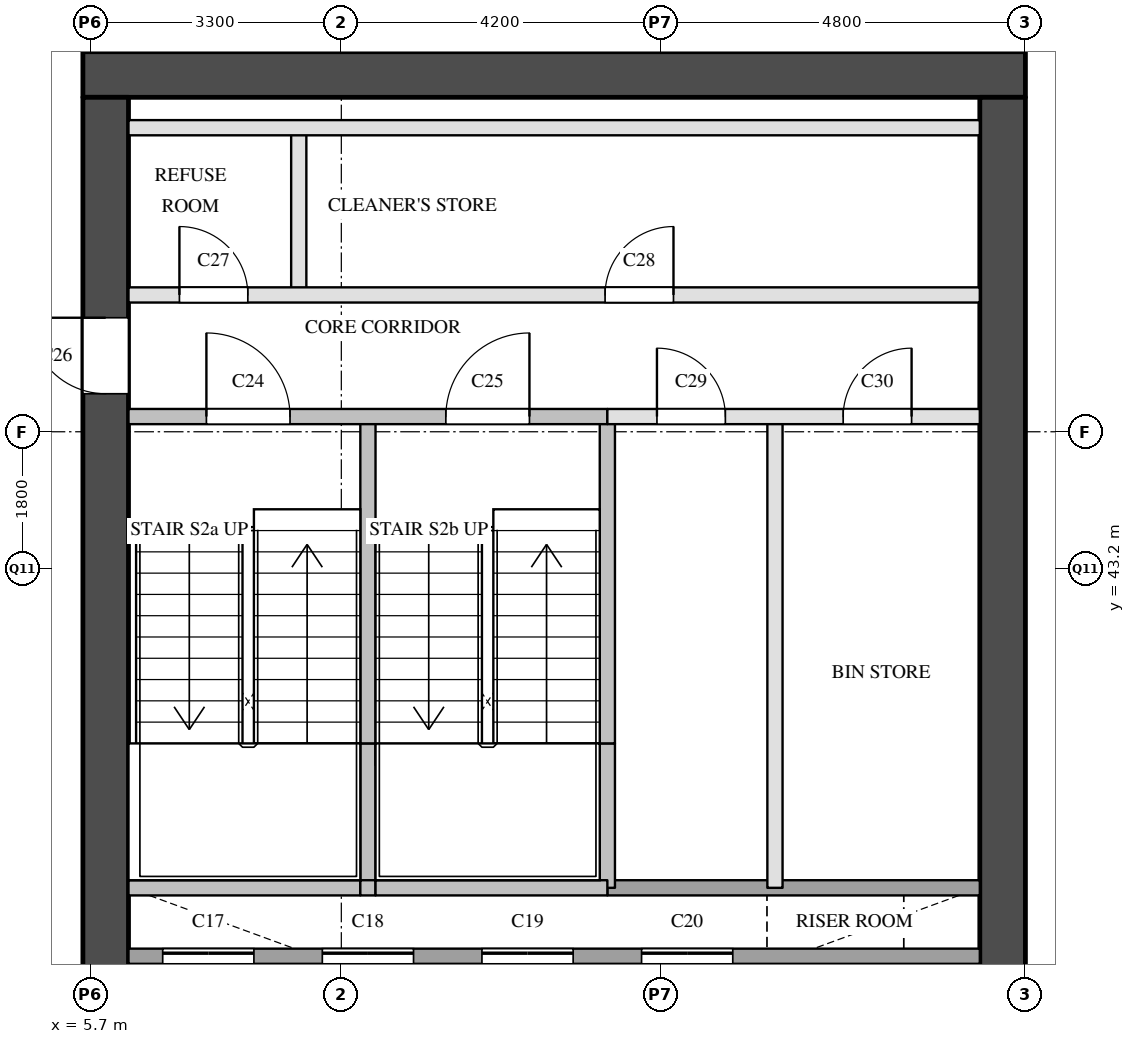
"""IFC4 building model, lengths in metres.
Left out: names, types, materials, properties, quantities, classifications, styles, units other than length and angle.
Written with IfcOpenShell. Run it as: python <this file> out.ifc"""

import sys

from ifc_helpers import new_model, si_unit, direction, frame, frame_2d, origin, place, context, subcontext, project, spatial, rectangle, extrude, element, fill, save


model = new_model("IFC4")
c1 = context("Model", 3, precision=1e-05, world=origin(), true_north=direction((0.0, 1.0)))
c2 = subcontext(c1, "Body", "Model", "MODEL_VIEW")
j1 = project(units=[si_unit("LENGTHUNIT", "METRE"), si_unit("PLANEANGLEUNIT", "RADIAN")], contexts=[c1])
p1 = place(None, origin())
s1 = spatial("IfcSite", under=j1, at=p1, CompositionType="ELEMENT")
p2 = place(p1, origin())
s2 = spatial("IfcBuilding", under=s1, at=p2, CompositionType="ELEMENT")
p3 = place(p2, frame((0.0, 0.0, 93.0)))
s3 = spatial("IfcBuildingStorey", under=s2, at=p3, CompositionType="ELEMENT", Elevation=93.0)
p4 = place(p3, frame((5.6, 49.7, 0.0), z_axis=(0.0, 0.0, 1.0), x_axis=(1.0, 0.0, 0.0)))
e1 = element("IfcWall", 1, at=p4, inside=s3, PredefinedType="SHEAR", context=c2, shape_type="SweptSolid", body=[
    extrude(rectangle(XDim=12.4, YDim=0.6, at=frame_2d((6.2, 0.0))), origin(), (0.0, 0.0, 1.0), 3.5),
])
p5 = place(p3, frame((5.9, 29.1, 0.0), z_axis=(0.0, 0.0, 1.0), x_axis=(0.0, 1.0, 0.0)))
e2 = element("IfcWall", 2, at=p5, inside=s3, PredefinedType="SHEAR", context=c2, shape_type="SweptSolid", body=[
    extrude(rectangle(XDim=20.3, YDim=0.6, at=frame_2d((10.15, 0.0))), origin(), (0.0, 0.0, 1.0), 3.5),
])
p6 = place(p5, frame((3.6, 0.0, 0.0)))
e3 = element("IfcOpeningElement", 3, at=p6, cuts=e2, PredefinedType="OPENING", context=c2, shape_type="SweptSolid", body=[
    extrude(rectangle(XDim=1.8, YDim=2.1, at=frame_2d((0.9, 1.05))), frame((0.0, 0.31, 0.0), z_axis=(0.0, -1.0, 0.0), x_axis=(1.0, 0.0, 0.0)), (0.0, 0.0, 1.0), 0.62),
])
p7 = place(p5, frame((16.4, 0.0, 0.0)))
e4 = element("IfcOpeningElement", 4, at=p7, cuts=e2, PredefinedType="OPENING", context=c2, shape_type="SweptSolid", body=[
    extrude(rectangle(XDim=1.0, YDim=2.1, at=frame_2d((0.5, 1.05))), frame((0.0, 0.31, 0.0), z_axis=(0.0, -1.0, 0.0), x_axis=(1.0, 0.0, 0.0)), (0.0, 0.0, 1.0), 0.62),
])
p8 = place(p3, frame((17.7, 29.1, 0.0), z_axis=(0.0, 0.0, 1.0), x_axis=(0.0, 1.0, 0.0)))
e5 = element("IfcWall", 5, at=p8, inside=s3, PredefinedType="SHEAR", context=c2, shape_type="SweptSolid", body=[
    extrude(rectangle(XDim=20.3, YDim=0.6, at=frame_2d((10.15, 0.0))), origin(), (0.0, 0.0, 1.0), 3.5),
])
p9 = place(p8, frame((1.25, 0.0, 0.0)))
e6 = element("IfcOpeningElement", 6, at=p9, cuts=e5, PredefinedType="OPENING", context=c2, shape_type="SweptSolid", body=[
    extrude(rectangle(XDim=0.7, YDim=2.1, at=frame_2d((0.35, 1.05))), frame((0.0, 0.31, 0.0), z_axis=(0.0, -1.0, 0.0), x_axis=(1.0, 0.0, 0.0)), (0.0, 0.0, 1.0), 0.62),
])
p10 = place(p8, frame((7.05, 0.0, 0.0)))
e7 = element("IfcOpeningElement", 7, at=p10, cuts=e5, PredefinedType="OPENING", context=c2, shape_type="SweptSolid", body=[
    extrude(rectangle(XDim=0.7, YDim=2.1, at=frame_2d((0.35, 1.05))), frame((0.0, 0.31, 0.0), z_axis=(0.0, -1.0, 0.0), x_axis=(1.0, 0.0, 0.0)), (0.0, 0.0, 1.0), 0.62),
])
p11 = place(p3, frame((8.3, 34.9, 0.0), z_axis=(0.0, 0.0, 1.0), x_axis=(0.0, 1.0, 0.0)))
e8 = element("IfcWall", 8, at=p11, inside=s3, PredefinedType="SOLIDWALL", context=c2, shape_type="SweptSolid", body=[
    extrude(rectangle(XDim=3.2, YDim=0.2, at=frame_2d((1.6, 0.0))), origin(), (0.0, 0.0, 1.0), 3.5),
])
p12 = place(p3, frame((8.44, 46.8, 0.0), z_axis=(0.0, 0.0, 1.0), x_axis=(0.0, 1.0, 0.0)))
e9 = element("IfcWall", 9, at=p12, inside=s3, PredefinedType="PARTITIONING", context=c2, shape_type="SweptSolid", body=[
    extrude(rectangle(XDim=2.2, YDim=0.2, at=frame_2d((1.1, 0.0))), origin(), (0.0, 0.0, 1.0), 3.5),
])
p13 = place(p3, frame((9.35, 39.0, 0.0), z_axis=(0.0, 0.0, 1.0), x_axis=(0.0, 1.0, 0.0)))
e10 = element("IfcWall", 10, at=p13, inside=s3, PredefinedType="SOLIDWALL", context=c2, shape_type="SweptSolid", body=[
    extrude(rectangle(XDim=1.9, YDim=0.2, at=frame_2d((0.95, 0.0))), origin(), (0.0, 0.0, 1.0), 3.5),
])
p14 = place(p3, frame((9.35, 40.9, 0.0), z_axis=(0.0, 0.0, 1.0), x_axis=(0.0, 1.0, 0.0)))
e11 = element("IfcWall", 11, at=p14, inside=s3, PredefinedType="SOLIDWALL", context=c2, shape_type="SweptSolid", body=[
    extrude(rectangle(XDim=4.3, YDim=0.2, at=frame_2d((2.15, 0.0))), origin(), (0.0, 0.0, 1.0), 3.5),
])
for number, where, z_axis, x_axis in (
    (12, (10.4, 34.9, 0.0), (0.0, 0.0, 1.0), (0.0, 1.0, 0.0)),
    (13, (12.5, 34.9, 0.0), (0.0, 0.0, 1.0), (0.0, 1.0, 0.0)),
):
    element("IfcWall", number, at=place(p3, frame(where, z_axis=z_axis, x_axis=x_axis)), inside=s3, PredefinedType="SOLIDWALL", context=c2, shape_type="SweptSolid", body=[
        extrude(rectangle(XDim=3.2, YDim=0.2, at=frame_2d((1.6, 0.0))), origin(), (0.0, 0.0, 1.0), 3.5),
    ])
p15 = place(p3, frame((12.5, 39.0, 0.0), z_axis=(0.0, 0.0, 1.0), x_axis=(0.0, 1.0, 0.0)))
e14 = element("IfcWall", 14, at=p15, inside=s3, PredefinedType="SOLIDWALL", context=c2, shape_type="SweptSolid", body=[
    extrude(rectangle(XDim=1.9, YDim=0.2, at=frame_2d((0.95, 0.0))), origin(), (0.0, 0.0, 1.0), 3.5),
])
p16 = place(p3, frame((12.5, 40.9, 0.0), z_axis=(0.0, 0.0, 1.0), x_axis=(0.0, 1.0, 0.0)))
e15 = element("IfcWall", 15, at=p16, inside=s3, PredefinedType="SOLIDWALL", context=c2, shape_type="SweptSolid", body=[
    extrude(rectangle(XDim=4.3, YDim=0.2, at=frame_2d((2.15, 0.0))), origin(), (0.0, 0.0, 1.0), 3.5),
])
p17 = place(p3, frame((14.6, 34.9, 0.0), z_axis=(0.0, 0.0, 1.0), x_axis=(0.0, 1.0, 0.0)))
e16 = element("IfcWall", 16, at=p17, inside=s3, PredefinedType="SOLIDWALL", context=c2, shape_type="SweptSolid", body=[
    extrude(rectangle(XDim=3.2, YDim=0.2, at=frame_2d((1.6, 0.0))), origin(), (0.0, 0.0, 1.0), 3.5),
])
p18 = place(p3, frame((14.705, 39.0, 0.0), z_axis=(0.0, 0.0, 1.0), x_axis=(0.0, 1.0, 0.0)))
e17 = element("IfcWall", 17, at=p18, inside=s3, PredefinedType="PARTITIONING", context=c2, shape_type="SweptSolid", body=[
    extrude(rectangle(XDim=6.2, YDim=0.2, at=frame_2d((3.1, 0.0))), origin(), (0.0, 0.0, 1.0), 3.5),
])
p19 = place(p3, frame((16.7, 34.9, 0.0), z_axis=(0.0, 0.0, 1.0), x_axis=(0.0, 1.0, 0.0)))
e18 = element("IfcWall", 18, at=p19, inside=s3, PredefinedType="SOLIDWALL", context=c2, shape_type="SweptSolid", body=[
    extrude(rectangle(XDim=3.2, YDim=0.2, at=frame_2d((1.6, 0.0))), origin(), (0.0, 0.0, 1.0), 3.5),
])
p20 = place(p3, frame((6.2, 38.1, 0.0), z_axis=(0.0, 0.0, 1.0), x_axis=(1.0, 0.0, 0.0)))
e19 = element("IfcWall", 19, at=p20, inside=s3, PredefinedType="SOLIDWALL", context=c2, shape_type="SweptSolid", body=[
    extrude(rectangle(XDim=11.2, YDim=0.2, at=frame_2d((5.6, 0.0))), origin(), (0.0, 0.0, 1.0), 3.5),
])
p21 = place(p20, frame((0.45, 0.0, 0.0)))
e20 = element("IfcOpeningElement", 20, at=p21, cuts=e19, PredefinedType="OPENING", context=c2, shape_type="SweptSolid", body=[
    extrude(rectangle(XDim=1.2, YDim=2.1, at=frame_2d((0.6, 1.05))), frame((0.0, 0.11, 0.0), z_axis=(0.0, -1.0, 0.0), x_axis=(1.0, 0.0, 0.0)), (0.0, 0.0, 1.0), 0.22),
])
p22 = place(p20, frame((2.55, 0.0, 0.0)))
e21 = element("IfcOpeningElement", 21, at=p22, cuts=e19, PredefinedType="OPENING", context=c2, shape_type="SweptSolid", body=[
    extrude(rectangle(XDim=1.2, YDim=2.1, at=frame_2d((0.6, 1.05))), frame((0.0, 0.11, 0.0), z_axis=(0.0, -1.0, 0.0), x_axis=(1.0, 0.0, 0.0)), (0.0, 0.0, 1.0), 0.22),
])
p23 = place(p20, frame((4.65, 0.0, 0.0)))
e22 = element("IfcOpeningElement", 22, at=p23, cuts=e19, PredefinedType="OPENING", context=c2, shape_type="SweptSolid", body=[
    extrude(rectangle(XDim=1.2, YDim=2.1, at=frame_2d((0.6, 1.05))), frame((0.0, 0.11, 0.0), z_axis=(0.0, -1.0, 0.0), x_axis=(1.0, 0.0, 0.0)), (0.0, 0.0, 1.0), 0.22),
])
p24 = place(p20, frame((6.75, 0.0, 0.0)))
e23 = element("IfcOpeningElement", 23, at=p24, cuts=e19, PredefinedType="OPENING", context=c2, shape_type="SweptSolid", body=[
    extrude(rectangle(XDim=1.2, YDim=2.1, at=frame_2d((0.6, 1.05))), frame((0.0, 0.11, 0.0), z_axis=(0.0, -1.0, 0.0), x_axis=(1.0, 0.0, 0.0)), (0.0, 0.0, 1.0), 0.22),
])
p25 = place(p3, frame((12.5, 39.0, 0.0), z_axis=(0.0, 0.0, 1.0), x_axis=(1.0, 0.0, 0.0)))
e24 = element("IfcWall", 24, at=p25, inside=s3, PredefinedType="SOLIDWALL", context=c2, shape_type="SweptSolid", body=[
    extrude(rectangle(XDim=4.9, YDim=0.2, at=frame_2d((2.45, 0.0))), origin(), (0.0, 0.0, 1.0), 3.5),
])
p26 = place(p3, frame((6.2, 39.0, 0.0), z_axis=(0.0, 0.0, 1.0), x_axis=(1.0, 0.0, 0.0)))
e25 = element("IfcWall", 25, at=p26, inside=s3, PredefinedType="SOLIDWALL", context=c2, shape_type="SweptSolid", body=[
    extrude(rectangle(XDim=3.05, YDim=0.2, at=frame_2d((1.525, 0.0))), origin(), (0.0, 0.0, 1.0), 3.5),
])
p27 = place(p3, frame((9.25, 39.0, 0.0), z_axis=(0.0, 0.0, 1.0), x_axis=(1.0, 0.0, 0.0)))
e26 = element("IfcWall", 26, at=p27, inside=s3, PredefinedType="SOLIDWALL", context=c2, shape_type="SweptSolid", body=[
    extrude(rectangle(XDim=0.2, YDim=0.2, at=frame_2d((0.1, 0.0))), origin(), (0.0, 0.0, 1.0), 3.5),
])
p28 = place(p3, frame((9.45, 39.0, 0.0), z_axis=(0.0, 0.0, 1.0), x_axis=(1.0, 0.0, 0.0)))
e27 = element("IfcWall", 27, at=p28, inside=s3, PredefinedType="SOLIDWALL", context=c2, shape_type="SweptSolid", body=[
    extrude(rectangle(XDim=3.05, YDim=0.2, at=frame_2d((1.525, 0.0))), origin(), (0.0, 0.0, 1.0), 3.5),
])
p29 = place(p3, frame((12.5, 45.2, 0.0), z_axis=(0.0, 0.0, 1.0), x_axis=(1.0, 0.0, 0.0)))
e28 = element("IfcWall", 28, at=p29, inside=s3, PredefinedType="PARTITIONING", context=c2, shape_type="SweptSolid", body=[
    extrude(rectangle(XDim=4.9, YDim=0.2, at=frame_2d((2.45, 0.0))), origin(), (0.0, 0.0, 1.0), 3.5),
])
p30 = place(p29, frame((0.653, 0.0, 0.0)))
e29 = element("IfcOpeningElement", 29, at=p30, cuts=e28, PredefinedType="OPENING", context=c2, shape_type="SweptSolid", body=[
    extrude(rectangle(XDim=0.9, YDim=2.1, at=frame_2d((0.45, 1.05))), frame((0.0, 0.11, 0.0), z_axis=(0.0, -1.0, 0.0), x_axis=(1.0, 0.0, 0.0)), (0.0, 0.0, 1.0), 0.22),
])
p31 = place(p29, frame((3.103, 0.0, 0.0)))
e30 = element("IfcOpeningElement", 30, at=p31, cuts=e28, PredefinedType="OPENING", context=c2, shape_type="SweptSolid", body=[
    extrude(rectangle(XDim=0.9, YDim=2.1, at=frame_2d((0.45, 1.05))), frame((0.0, 0.11, 0.0), z_axis=(0.0, -1.0, 0.0), x_axis=(1.0, 0.0, 0.0)), (0.0, 0.0, 1.0), 0.22),
])
p32 = place(p3, frame((6.2, 45.2, 0.0), z_axis=(0.0, 0.0, 1.0), x_axis=(1.0, 0.0, 0.0)))
e31 = element("IfcWall", 31, at=p32, inside=s3, PredefinedType="SOLIDWALL", context=c2, shape_type="SweptSolid", body=[
    extrude(rectangle(XDim=6.3, YDim=0.2, at=frame_2d((3.15, 0.0))), origin(), (0.0, 0.0, 1.0), 3.5),
])
p33 = place(p32, frame((1.025, 0.0, 0.0)))
e32 = element("IfcOpeningElement", 32, at=p33, cuts=e31, PredefinedType="OPENING", context=c2, shape_type="SweptSolid", body=[
    extrude(rectangle(XDim=1.1, YDim=2.1, at=frame_2d((0.55, 1.05))), frame((0.0, 0.11, 0.0), z_axis=(0.0, -1.0, 0.0), x_axis=(1.0, 0.0, 0.0)), (0.0, 0.0, 1.0), 0.22),
])
p34 = place(p32, frame((4.175, 0.0, 0.0)))
e33 = element("IfcOpeningElement", 33, at=p34, cuts=e31, PredefinedType="OPENING", context=c2, shape_type="SweptSolid", body=[
    extrude(rectangle(XDim=1.1, YDim=2.1, at=frame_2d((0.55, 1.05))), frame((0.0, 0.11, 0.0), z_axis=(0.0, -1.0, 0.0), x_axis=(1.0, 0.0, 0.0)), (0.0, 0.0, 1.0), 0.22),
])
p35 = place(p3, frame((6.2, 46.8, 0.0), z_axis=(0.0, 0.0, 1.0), x_axis=(1.0, 0.0, 0.0)))
e34 = element("IfcWall", 34, at=p35, inside=s3, PredefinedType="PARTITIONING", context=c2, shape_type="SweptSolid", body=[
    extrude(rectangle(XDim=11.2, YDim=0.2, at=frame_2d((5.6, 0.0))), origin(), (0.0, 0.0, 1.0), 3.5),
])
p36 = place(p35, frame((0.67, 0.0, 0.0)))
e35 = element("IfcOpeningElement", 35, at=p36, cuts=e34, PredefinedType="OPENING", context=c2, shape_type="SweptSolid", body=[
    extrude(rectangle(XDim=0.9, YDim=2.1, at=frame_2d((0.45, 1.05))), frame((0.0, 0.11, 0.0), z_axis=(0.0, -1.0, 0.0), x_axis=(1.0, 0.0, 0.0)), (0.0, 0.0, 1.0), 0.22),
])
p37 = place(p35, frame((6.27, 0.0, 0.0)))
e36 = element("IfcOpeningElement", 36, at=p37, cuts=e34, PredefinedType="OPENING", context=c2, shape_type="SweptSolid", body=[
    extrude(rectangle(XDim=0.9, YDim=2.1, at=frame_2d((0.45, 1.05))), frame((0.0, 0.11, 0.0), z_axis=(0.0, -1.0, 0.0), x_axis=(1.0, 0.0, 0.0)), (0.0, 0.0, 1.0), 0.22),
])
p38 = place(p3, frame((6.2, 49.0, 0.0), z_axis=(0.0, 0.0, 1.0), x_axis=(1.0, 0.0, 0.0)))
e37 = element("IfcWall", 37, at=p38, inside=s3, PredefinedType="PARTITIONING", context=c2, shape_type="SweptSolid", body=[
    extrude(rectangle(XDim=11.2, YDim=0.2, at=frame_2d((5.6, 0.0))), origin(), (0.0, 0.0, 1.0), 3.5),
])
p39 = place(p21, origin())
e38 = element("IfcDoor", 38, at=p39, inside=s3, OperationType="SLIDING_TO_LEFT", PredefinedType="DOOR", context=c2, shape_type="SweptSolid", body=[
    extrude(rectangle(XDim=1.2, YDim=2.1, at=frame_2d((0.6, 1.05))), frame((0.0, 0.025, 0.0), z_axis=(0.0, -1.0, 0.0), x_axis=(1.0, 0.0, 0.0)), (0.0, 0.0, 1.0), 0.05),
])
fill(e20, e38)
p40 = place(p22, origin())
e39 = element("IfcDoor", 39, at=p40, inside=s3, OperationType="SLIDING_TO_LEFT", PredefinedType="DOOR", context=c2, shape_type="SweptSolid", body=[
    extrude(rectangle(XDim=1.2, YDim=2.1, at=frame_2d((0.6, 1.05))), frame((0.0, 0.025, 0.0), z_axis=(0.0, -1.0, 0.0), x_axis=(1.0, 0.0, 0.0)), (0.0, 0.0, 1.0), 0.05),
])
fill(e21, e39)
p41 = place(p23, origin())
e40 = element("IfcDoor", 40, at=p41, inside=s3, OperationType="SLIDING_TO_LEFT", PredefinedType="DOOR", context=c2, shape_type="SweptSolid", body=[
    extrude(rectangle(XDim=1.2, YDim=2.1, at=frame_2d((0.6, 1.05))), frame((0.0, 0.025, 0.0), z_axis=(0.0, -1.0, 0.0), x_axis=(1.0, 0.0, 0.0)), (0.0, 0.0, 1.0), 0.05),
])
fill(e22, e40)
p42 = place(p24, origin())
e41 = element("IfcDoor", 41, at=p42, inside=s3, OperationType="SLIDING_TO_LEFT", PredefinedType="DOOR", context=c2, shape_type="SweptSolid", body=[
    extrude(rectangle(XDim=1.2, YDim=2.1, at=frame_2d((0.6, 1.05))), frame((0.0, 0.025, 0.0), z_axis=(0.0, -1.0, 0.0), x_axis=(1.0, 0.0, 0.0)), (0.0, 0.0, 1.0), 0.05),
])
fill(e23, e41)
p43 = place(p33, origin())
e42 = element("IfcDoor", 42, at=p43, inside=s3, OperationType="SINGLE_SWING_LEFT", PredefinedType="DOOR", context=c2, shape_type="SweptSolid", body=[
    extrude(rectangle(XDim=1.1, YDim=2.1, at=frame_2d((0.55, 1.05))), frame((0.0, 0.025, 0.0), z_axis=(0.0, -1.0, 0.0), x_axis=(1.0, 0.0, 0.0)), (0.0, 0.0, 1.0), 0.05),
])
fill(e32, e42)
p44 = place(p34, origin())
e43 = element("IfcDoor", 43, at=p44, inside=s3, OperationType="SINGLE_SWING_RIGHT", PredefinedType="DOOR", context=c2, shape_type="SweptSolid", body=[
    extrude(rectangle(XDim=1.1, YDim=2.1, at=frame_2d((0.55, 1.05))), frame((0.0, 0.025, 0.0), z_axis=(0.0, -1.0, 0.0), x_axis=(1.0, 0.0, 0.0)), (0.0, 0.0, 1.0), 0.05),
])
fill(e33, e43)
p45 = place(p7, origin())
e44 = element("IfcDoor", 44, at=p45, inside=s3, OperationType="SINGLE_SWING_RIGHT", PredefinedType="DOOR", context=c2, shape_type="SweptSolid", body=[
    extrude(rectangle(XDim=1.0, YDim=2.1, at=frame_2d((0.5, 1.05))), frame((0.0, 0.025, 0.0), z_axis=(0.0, -1.0, 0.0), x_axis=(1.0, 0.0, 0.0)), (0.0, 0.0, 1.0), 0.05),
])
fill(e4, e44)
p46 = place(p36, origin())
e45 = element("IfcDoor", 45, at=p46, inside=s3, OperationType="SINGLE_SWING_LEFT", PredefinedType="DOOR", context=c2, shape_type="SweptSolid", body=[
    extrude(rectangle(XDim=0.9, YDim=2.1, at=frame_2d((0.45, 1.05))), frame((0.0, 0.025, 0.0), z_axis=(0.0, -1.0, 0.0), x_axis=(1.0, 0.0, 0.0)), (0.0, 0.0, 1.0), 0.05),
])
fill(e35, e45)
p47 = place(p37, origin())
e46 = element("IfcDoor", 46, at=p47, inside=s3, OperationType="SINGLE_SWING_RIGHT", PredefinedType="DOOR", context=c2, shape_type="SweptSolid", body=[
    extrude(rectangle(XDim=0.9, YDim=2.1, at=frame_2d((0.45, 1.05))), frame((0.0, 0.025, 0.0), z_axis=(0.0, -1.0, 0.0), x_axis=(1.0, 0.0, 0.0)), (0.0, 0.0, 1.0), 0.05),
])
fill(e36, e46)
p48 = place(p30, origin())
e47 = element("IfcDoor", 47, at=p48, inside=s3, OperationType="SINGLE_SWING_LEFT", PredefinedType="DOOR", context=c2, shape_type="SweptSolid", body=[
    extrude(rectangle(XDim=0.9, YDim=2.1, at=frame_2d((0.45, 1.05))), frame((0.0, 0.025, 0.0), z_axis=(0.0, -1.0, 0.0), x_axis=(1.0, 0.0, 0.0)), (0.0, 0.0, 1.0), 0.05),
])
fill(e29, e47)
p49 = place(p31, origin())
e48 = element("IfcDoor", 48, at=p49, inside=s3, OperationType="SINGLE_SWING_RIGHT", PredefinedType="DOOR", context=c2, shape_type="SweptSolid", body=[
    extrude(rectangle(XDim=0.9, YDim=2.1, at=frame_2d((0.45, 1.05))), frame((0.0, 0.025, 0.0), z_axis=(0.0, -1.0, 0.0), x_axis=(1.0, 0.0, 0.0)), (0.0, 0.0, 1.0), 0.05),
])
fill(e30, e48)
save(model, sys.argv[1])
